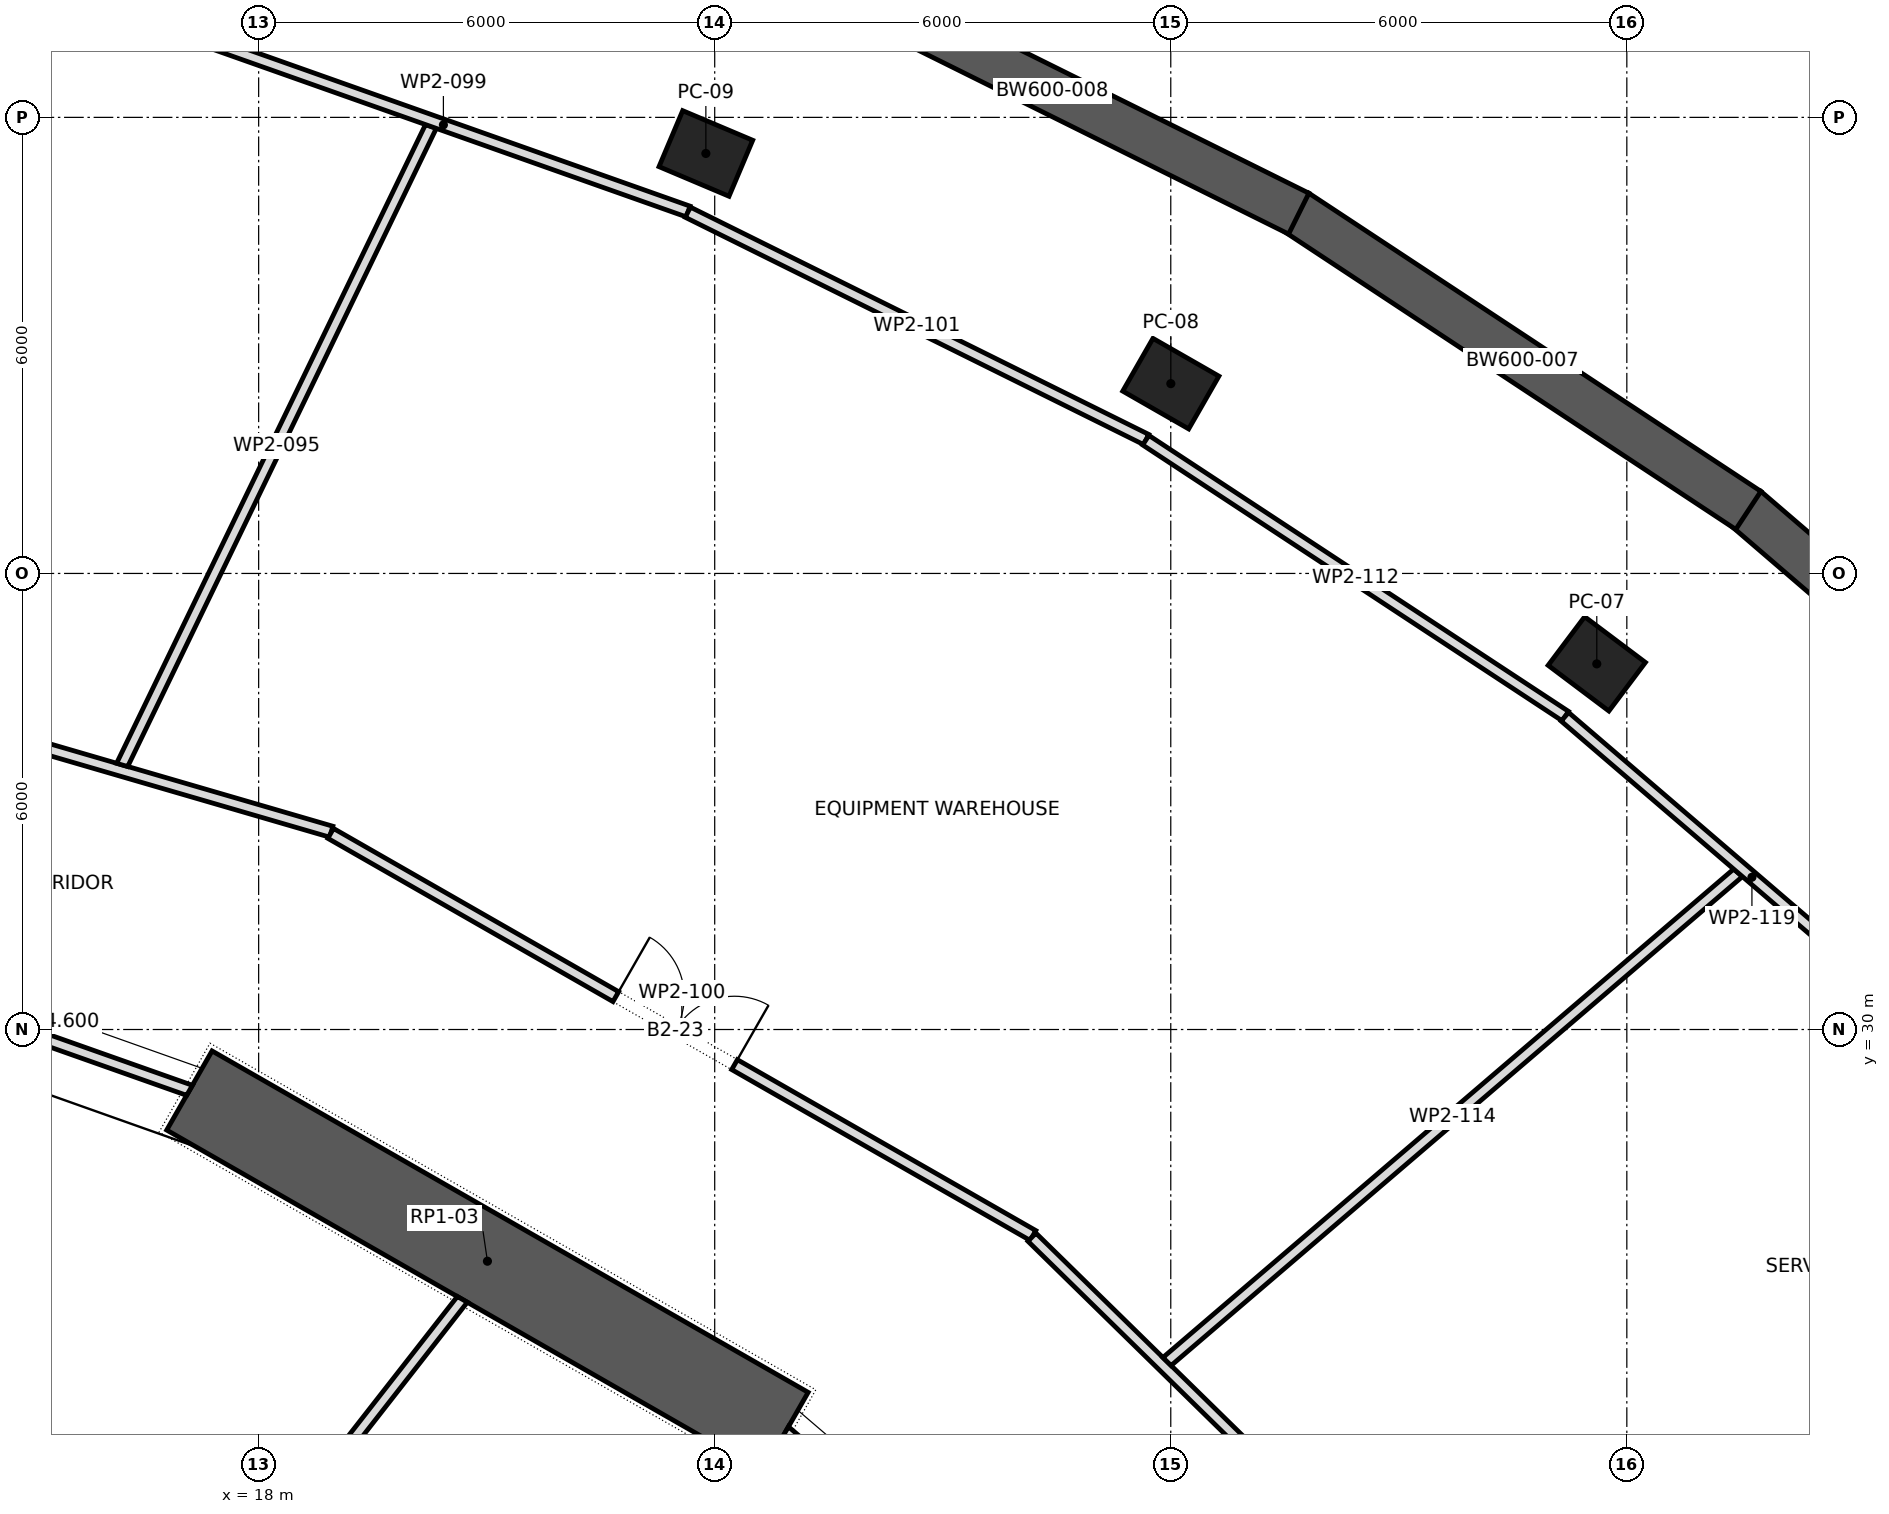
"""IFC4 building model, lengths in metres.
Left out: names, types, materials, properties, quantities, classifications, styles, units other than length and angle.
Written with IfcOpenShell. Run it as: python <this file> out.ifc"""

import sys

from ifc_helpers import new_model, si_unit, direction, frame, frame_2d, origin, origin_2d, place, context, subcontext, project, spatial, polyline, rectangle, outline, extrude, element, fill, save


model = new_model("IFC4")
c1 = context("Model", 3, precision=1e-05, world=origin(), true_north=direction((0.0, 1.0)))
c2 = subcontext(c1, "Body", "Model", "MODEL_VIEW")
j1 = project(units=[si_unit("LENGTHUNIT", "METRE"), si_unit("PLANEANGLEUNIT", "RADIAN")], contexts=[c1])
p1 = place(None, origin())
s1 = spatial("IfcSite", under=j1, at=p1, CompositionType="ELEMENT")
p2 = place(p1, origin())
s2 = spatial("IfcBuilding", under=s1, at=p2, CompositionType="ELEMENT")
p3 = place(p2, frame((0.0, 0.0, -9.5)))
s3 = spatial("IfcBuildingStorey", under=s2, at=p3, CompositionType="ELEMENT", Elevation=-9.5)
for number, where, z_axis, x_axis in (
    (1, (35.605, 34.81, 0.0), (0.0, 0.0, 1.0), (-0.799, 0.601, 0.0)),
    (2, (30.001, 38.497, 0.0), (0.0, 0.0, 1.0), (-0.868, 0.497, 0.0)),
    (3, (23.884, 41.525, 0.0), (0.0, 0.0, 1.0), (-0.921, 0.389, 0.0)),
):
    element("IfcColumn", number, at=place(p3, frame(where, z_axis=z_axis, x_axis=x_axis)), inside=s3, PredefinedType="COLUMN", context=c2, shape_type="SweptSolid", body=[
        extrude(rectangle(XDim=1.0, YDim=0.8, at=origin_2d()), origin(), (0.0, 0.0, 1.0), 5.5),
    ])
p4 = place(p3, frame((24.931, 24.706, 0.0), z_axis=(0.0, 0.0, 1.0), x_axis=(-0.867760656864, 0.496982336103, 0.0)))
e4 = element("IfcWall", 4, at=p4, inside=s3, PredefinedType="SHEAR", context=c2, shape_type="SweptSolid", body=[
    extrude(rectangle(XDim=9.038, YDim=1.2, at=frame_2d((4.519, 0.0))), origin(), (0.0, 0.0, 1.0), 5.5),
])
p5 = place(p3, frame((42.87, 32.295, 0.0), z_axis=(0.0, 0.0, 1.0), x_axis=(-0.758319142722, 0.65188348482, 0.0)))
e5 = element("IfcWall", 5, at=p5, inside=s3, PredefinedType="SOLIDWALL", context=c2, shape_type="SweptSolid", body=[
    extrude(rectangle(XDim=6.991, YDim=0.6, at=frame_2d((3.496, 0.0))), origin(), (0.0, 0.0, 1.0), 5.5),
])
p6 = place(p3, frame((37.599, 36.83, 0.0), z_axis=(0.0, 0.0, 1.0), x_axis=(-0.834745196239, 0.550636411215, 0.0)))
e6 = element("IfcWall", 6, at=p6, inside=s3, PredefinedType="SOLIDWALL", context=c2, shape_type="SweptSolid", body=[
    extrude(rectangle(XDim=7.124, YDim=0.6, at=frame_2d((3.562, 0.0))), origin(), (0.0, 0.0, 1.0), 5.5),
])
p7 = place(p3, frame((31.684, 40.734, 0.0), z_axis=(0.0, 0.0, 1.0), x_axis=(-0.895750986496, 0.44455614965, 0.0)))
e7 = element("IfcWall", 7, at=p7, inside=s3, PredefinedType="SOLIDWALL", context=c2, shape_type="SweptSolid", body=[
    extrude(rectangle(XDim=7.245, YDim=0.6, at=frame_2d((3.623, 0.0))), origin(), (0.0, 0.0, 1.0), 5.5),
])
p8 = place(p3, frame((8.416, 35.672, 0.0), z_axis=(0.0, 0.0, 1.0), x_axis=(0.960099578905, -0.279658360479, 0.0)))
e8 = element("IfcWall", 8, at=p8, inside=s3, PredefinedType="PARTITIONING", context=c2, shape_type="SweptSolid", body=[
    extrude(rectangle(XDim=10.977, YDim=0.15, at=frame_2d((5.489, 0.0))), origin(), (0.0, 0.0, 1.0), 5.05),
])
p9 = place(p3, frame((11.788, 15.074, 0.0), z_axis=(0.0, 0.0, 1.0), x_axis=(0.615848120598, 0.787864894735, 0.0)))
e9 = element("IfcWall", 9, at=p9, inside=s3, PredefinedType="PARTITIONING", context=c2, shape_type="SweptSolid", body=[
    extrude(outline(polyline([(0.0, -0.075), (14.449, -0.075), (14.428, 0.075), (0.0, 0.075), (0.0, -0.075)])), origin(), (0.0, 0.0, 1.0), 5.05),
])
p10 = place(p3, frame((16.204, 33.481, 0.0), z_axis=(0.0, 0.0, 1.0), x_axis=(0.435389941519, 0.90024196682, 0.0)))
e10 = element("IfcWall", 10, at=p10, inside=s3, PredefinedType="PARTITIONING", context=c2, shape_type="SweptSolid", body=[
    extrude(outline(polyline([(0.013, -0.075), (9.339, -0.075), (9.323, 0.075), (-0.013, 0.075), (0.013, -0.075)])), origin(), (0.0, 0.0, 1.0), 5.05),
])
p11 = place(p3, frame((17.091, 29.2, 0.0), z_axis=(0.0, 0.0, 1.0), x_axis=(-0.942814385805, 0.333318217204, 0.0)))
e11 = element("IfcWall", 11, at=p11, inside=s3, PredefinedType="PARTITIONING", context=c2, shape_type="SweptSolid", body=[
    extrude(outline(polyline([(-0.014, -0.075), (5.448, -0.075), (5.422, 0.075), (0.014, 0.075), (-0.014, -0.075)])), origin(), (0.0, 0.0, 1.0), 4.6),
])
p12 = place(p3, frame((17.211, 43.042, 0.0), z_axis=(0.0, 0.0, 1.0), x_axis=(0.94266330093, -0.333745263757, 0.0)))
e12 = element("IfcWall", 12, at=p12, inside=s3, PredefinedType="PARTITIONING", context=c2, shape_type="SweptSolid", body=[
    extrude(rectangle(XDim=6.832, YDim=0.15, at=frame_2d((3.416, 0.0))), origin(), (0.0, 0.0, 1.0), 5.05),
])
p13 = place(p3, frame((18.948, 32.58, 0.0), z_axis=(0.0, 0.0, 1.0), x_axis=(0.867835024459, -0.496852463336, 0.0)))
e13 = element("IfcWall", 13, at=p13, inside=s3, PredefinedType="PARTITIONING", context=c2, shape_type="SweptSolid", body=[
    extrude(rectangle(XDim=10.647, YDim=0.15, at=frame_2d((5.323, 0.0))), origin(), (0.0, 0.0, 1.0), 5.05),
])
p14 = place(p13, frame((4.323, 0.0, 0.0)))
e14 = element("IfcOpeningElement", 14, at=p14, cuts=e13, PredefinedType="OPENING", context=c2, shape_type="SweptSolid", body=[
    extrude(rectangle(XDim=1.8, YDim=2.1, at=frame_2d((0.9, 1.05))), frame((0.0, 0.087, 0.0), z_axis=(0.0, -1.0, 0.0), x_axis=(1.0, 0.0, 0.0)), (0.0, 0.0, 1.0), 0.174),
])
p15 = place(p3, frame((23.646, 40.752, 0.0), z_axis=(0.0, 0.0, 1.0), x_axis=(0.895909442692, -0.444236727991, 0.0)))
e15 = element("IfcWall", 15, at=p15, inside=s3, PredefinedType="PARTITIONING", context=c2, shape_type="SweptSolid", body=[
    extrude(rectangle(XDim=6.731, YDim=0.15, at=frame_2d((3.365, 0.0))), origin(), (0.0, 0.0, 1.0), 5.05),
])
p16 = place(p3, frame((28.174, 27.268, 0.0), z_axis=(0.0, 0.0, 1.0), x_axis=(0.714427427428, -0.699709547554, 0.0)))
e16 = element("IfcWall", 16, at=p16, inside=s3, PredefinedType="PARTITIONING", context=c2, shape_type="SweptSolid", body=[
    extrude(rectangle(XDim=10.202, YDim=0.15, at=frame_2d((5.101, 0.0))), origin(), (0.0, 0.0, 1.0), 5.05),
])
p17 = place(p16, frame((5.74, 0.0, 0.0)))
e17 = element("IfcOpeningElement", 17, at=p17, cuts=e16, PredefinedType="OPENING", context=c2, shape_type="SweptSolid", body=[
    extrude(rectangle(XDim=1.0, YDim=2.1, at=frame_2d((0.5, 1.05))), frame((0.0, 0.087, 0.0), z_axis=(0.0, -1.0, 0.0), x_axis=(1.0, 0.0, 0.0)), (0.0, 0.0, 1.0), 0.174),
])
p18 = place(p3, frame((28.789, 21.411, 0.0), z_axis=(0.0, 0.0, 1.0), x_axis=(-0.760084552743, 0.649824185978, 0.0)))
e18 = element("IfcWall", 18, at=p18, inside=s3, PredefinedType="PARTITIONING", context=c2, shape_type="SweptSolid", body=[
    extrude(outline(polyline([(-0.015, -0.075), (5.089, -0.075), (5.061, 0.075), (0.015, 0.075), (-0.015, -0.075)])), origin(), (0.0, 0.0, 1.0), 4.6),
])
p19 = place(p3, frame((29.671, 37.753, 0.0), z_axis=(0.0, 0.0, 1.0), x_axis=(0.83553583791, -0.549435950378, 0.0)))
e19 = element("IfcWall", 19, at=p19, inside=s3, PredefinedType="PARTITIONING", context=c2, shape_type="SweptSolid", body=[
    extrude(rectangle(XDim=6.606, YDim=0.15, at=frame_2d((3.303, 0.0))), origin(), (0.0, 0.0, 1.0), 5.05),
])
p20 = place(p3, frame((29.95, 25.632, 0.0), z_axis=(0.0, 0.0, 1.0), x_axis=(0.759739094859, 0.650228042876, 0.0)))
e20 = element("IfcWall", 20, at=p20, inside=s3, PredefinedType="PARTITIONING", context=c2, shape_type="SweptSolid", body=[
    extrude(outline(polyline([(0.007, -0.075), (9.901, -0.075), (9.878, 0.075), (-0.007, 0.075), (0.007, -0.075)])), origin(), (0.0, 0.0, 1.0), 5.05),
])
p21 = place(p3, frame((35.185, 34.114, 0.0), z_axis=(0.0, 0.0, 1.0), x_axis=(0.759033312601, -0.651051787773, 0.0)))
e21 = element("IfcWall", 21, at=p21, inside=s3, PredefinedType="PARTITIONING", context=c2, shape_type="SweptSolid", body=[
    extrude(rectangle(XDim=6.484, YDim=0.15, at=frame_2d((3.242, 0.0))), origin(), (0.0, 0.0, 1.0), 5.05),
])
p22 = place(p14, origin())
e22 = element("IfcDoor", 22, at=p22, inside=s3, OperationType="DOUBLE_DOOR_SINGLE_SWING", PredefinedType="DOOR", context=c2, shape_type="SweptSolid", body=[
    extrude(rectangle(XDim=1.8, YDim=2.1, at=frame_2d((0.9, 1.05))), frame((0.0, 0.025, 0.0), z_axis=(0.0, -1.0, 0.0), x_axis=(1.0, 0.0, 0.0)), (0.0, 0.0, 1.0), 0.05),
])
fill(e14, e22)
save(model, sys.argv[1])
